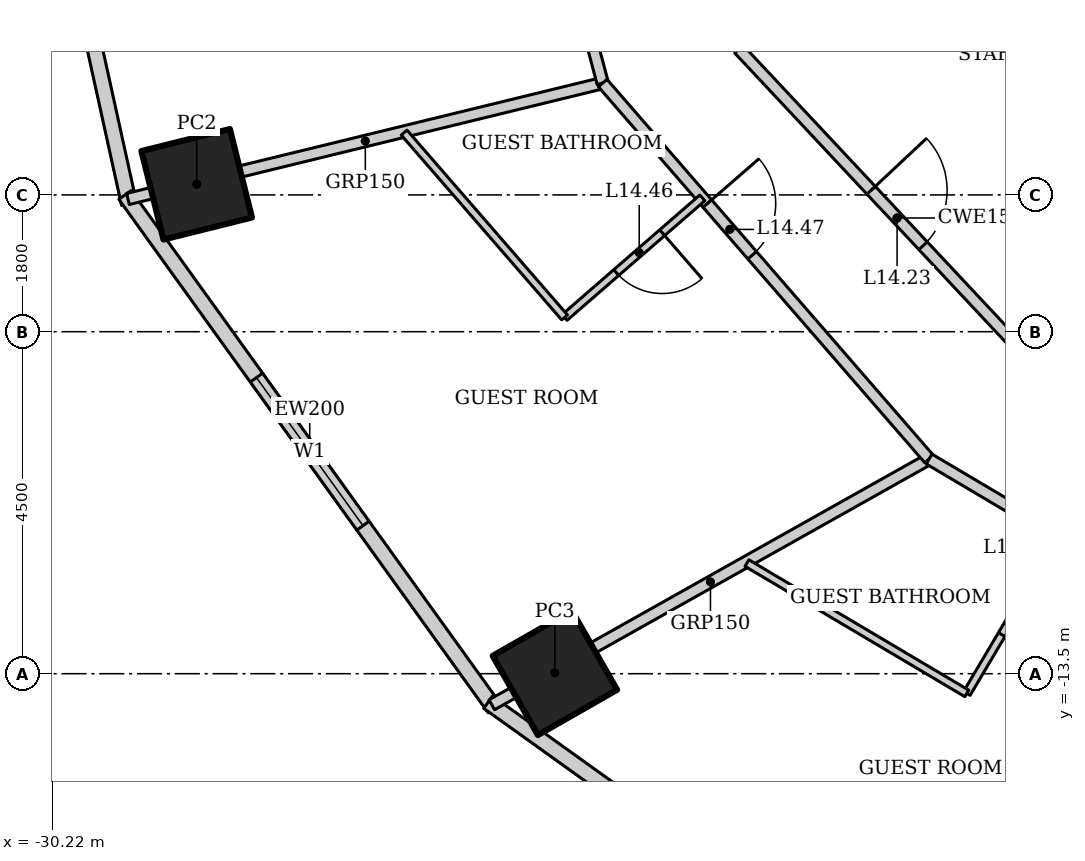
"""IFC4 building model, lengths in metres.
Left out: names, types, materials, properties, quantities, classifications, styles, units other than length and angle.
Written with IfcOpenShell. Run it as: python <this file> out.ifc"""

import sys

from ifc_helpers import new_model, si_unit, direction, frame, frame_2d, origin, origin_2d, place, context, subcontext, project, spatial, rectangle, hollow_rectangle, extrude, element, fill, save


model = new_model("IFC4")
c1 = context("Model", 3, precision=1e-05, world=origin(), true_north=direction((0.0, 1.0)))
c2 = subcontext(c1, "Body", "Model", "MODEL_VIEW")
j1 = project(units=[si_unit("LENGTHUNIT", "METRE"), si_unit("PLANEANGLEUNIT", "RADIAN")], contexts=[c1])
p1 = place(None, origin())
s1 = spatial("IfcSite", under=j1, at=p1, CompositionType="ELEMENT")
p2 = place(p1, origin())
s2 = spatial("IfcBuilding", under=s1, at=p2, CompositionType="ELEMENT")
p3 = place(p2, frame((0.0, 0.0, 65.8)))
s3 = spatial("IfcBuildingStorey", under=s2, at=p3, CompositionType="ELEMENT", Elevation=65.8)
p4 = place(p3, frame((-28.318, -7.06, 0.0), z_axis=(0.0, 0.0, 1.0), x_axis=(0.970295726276, 0.2419218956, 0.0)))
e1 = element("IfcColumn", 1, at=p4, inside=s3, PredefinedType="COLUMN", context=c2, shape_type="SweptSolid", body=[
    extrude(hollow_rectangle(XDim=1.2, YDim=1.2, WallThickness=0.1, at=origin_2d()), origin(), (0.0, 0.0, 1.0), 3.6),
])
p5 = place(p3, frame((-23.605, -13.489, 0.0), z_axis=(0.0, 0.0, 1.0), x_axis=(0.86824298017, 0.496139221777, 0.0)))
e2 = element("IfcColumn", 2, at=p5, inside=s3, PredefinedType="COLUMN", context=c2, shape_type="SweptSolid", body=[
    extrude(hollow_rectangle(XDim=1.2, YDim=1.2, WallThickness=0.12, at=origin_2d()), origin(), (0.0, 0.0, 1.0), 3.6),
])
p6 = place(p3, frame((-30.835, 0.067, 0.0), z_axis=(0.0, 0.0, 1.0), x_axis=(0.215238065514, -0.976561608478, 0.0)))
e3 = element("IfcWall", 3, at=p6, inside=s3, PredefinedType="SOLIDWALL", context=c2, shape_type="SweptSolid", body=[
    extrude(rectangle(XDim=7.562, YDim=0.2, at=frame_2d((3.781, 0.0))), origin(), (0.0, 0.0, 1.0), 3.4),
])
p7 = place(p6, frame((2.581, 0.0, 0.5)))
e4 = element("IfcOpeningElement", 4, at=p7, cuts=e3, PredefinedType="OPENING", context=c2, shape_type="SweptSolid", body=[
    extrude(rectangle(XDim=2.4, YDim=2.2, at=frame_2d((1.2, 1.1))), frame((0.0, 0.11, 0.0), z_axis=(0.0, -1.0, 0.0), x_axis=(1.0, 0.0, 0.0)), (0.0, 0.0, 1.0), 0.22),
])
p8 = place(p3, frame((-29.26, -7.2, 0.0), z_axis=(0.0, 0.0, 1.0), x_axis=(0.583937613703, -0.811798536155, 0.0)))
e5 = element("IfcWall", 5, at=p8, inside=s3, PredefinedType="SOLIDWALL", context=c2, shape_type="SweptSolid", body=[
    extrude(rectangle(XDim=8.323, YDim=0.2, at=frame_2d((4.162, 0.0))), origin(), (0.0, 0.0, 1.0), 3.4),
])
p9 = place(p8, frame((2.961, 0.0, 0.5)))
e6 = element("IfcOpeningElement", 6, at=p9, cuts=e5, PredefinedType="OPENING", context=c2, shape_type="SweptSolid", body=[
    extrude(rectangle(XDim=2.4, YDim=2.2, at=frame_2d((1.2, 1.1))), frame((0.0, 0.11, 0.0), z_axis=(0.0, -1.0, 0.0), x_axis=(1.0, 0.0, 0.0)), (0.0, 0.0, 1.0), 0.22),
])
p10 = place(p3, frame((-24.482, -13.875, 0.0), z_axis=(0.0, 0.0, 1.0), x_axis=(0.812791321576, -0.582554948112, 0.0)))
e7 = element("IfcWall", 7, at=p10, inside=s3, PredefinedType="SOLIDWALL", context=c2, shape_type="SweptSolid", body=[
    extrude(rectangle(XDim=8.063, YDim=0.2, at=frame_2d((4.032, 0.0))), origin(), (0.0, 0.0, 1.0), 3.4),
])
p11 = place(p10, frame((2.832, 0.0, 0.5)))
e8 = element("IfcOpeningElement", 8, at=p11, cuts=e7, PredefinedType="OPENING", context=c2, shape_type="SweptSolid", body=[
    extrude(rectangle(XDim=2.4, YDim=2.2, at=frame_2d((1.2, 1.1))), frame((0.0, 0.11, 0.0), z_axis=(0.0, -1.0, 0.0), x_axis=(1.0, 0.0, 0.0)), (0.0, 0.0, 1.0), 0.22),
])
p12 = place(p3, frame((-29.222, -7.254, 0.0), z_axis=(0.0, 0.0, 1.0), x_axis=(0.971456980633, 0.237215797913, 0.0)))
e9 = element("IfcWall", 9, at=p12, inside=s3, PredefinedType="PARTITIONING", context=c2, shape_type="SweptSolid", body=[
    extrude(rectangle(XDim=6.429, YDim=0.15, at=frame_2d((3.215, 0.0))), origin(), (0.0, 0.0, 1.0), 2.332),
])
p13 = place(p3, frame((-24.435, -13.909, 0.0), z_axis=(0.0, 0.0, 1.0), x_axis=(0.871747379892, 0.489955616001, 0.0)))
e10 = element("IfcWall", 10, at=p13, inside=s3, PredefinedType="PARTITIONING", context=c2, shape_type="SweptSolid", body=[
    extrude(rectangle(XDim=6.6, YDim=0.15, at=frame_2d((3.3, 0.0))), origin(), (0.0, 0.0, 1.0), 2.693),
])
p14 = place(p3, frame((-17.97, -18.542, 0.0), z_axis=(0.0, 0.0, 1.0), x_axis=(0.699736251994, 0.714401272147, 0.0)))
e11 = element("IfcWall", 11, at=p14, inside=s3, PredefinedType="PARTITIONING", context=c2, shape_type="SweptSolid", body=[
    extrude(rectangle(XDim=6.593, YDim=0.15, at=frame_2d((3.296, 0.0))), origin(), (0.0, 0.0, 1.0), 2.528),
])
p15 = place(p3, frame((-24.5, 0.0, 0.0), z_axis=(0.0, 0.0, 1.0), x_axis=(0.257083265334, -0.966389256296, 0.0)))
e12 = element("IfcWall", 12, at=p15, inside=s3, PredefinedType="PARTITIONING", context=c2, shape_type="SweptSolid", body=[
    extrude(rectangle(XDim=5.928, YDim=0.15, at=frame_2d((2.964, 0.0))), origin(), (0.0, 0.0, 1.0), 3.45),
])
p16 = place(p15, frame((2.1, 0.0, 0.0)))
e13 = element("IfcOpeningElement", 13, at=p16, cuts=e12, PredefinedType="OPENING", context=c2, shape_type="SweptSolid", body=[
    extrude(rectangle(XDim=0.9, YDim=2.1, at=frame_2d((0.45, 1.05))), frame((0.0, 0.085, 0.0), z_axis=(0.0, -1.0, 0.0), x_axis=(1.0, 0.0, 0.0)), (0.0, 0.0, 1.0), 0.17),
])
p17 = place(p3, frame((-22.976, -5.729, 0.0), z_axis=(0.0, 0.0, 1.0), x_axis=(0.655599989166, -0.755108372491, 0.0)))
e14 = element("IfcWall", 14, at=p17, inside=s3, PredefinedType="PARTITIONING", context=c2, shape_type="SweptSolid", body=[
    extrude(rectangle(XDim=6.551, YDim=0.15, at=frame_2d((3.275, 0.0))), origin(), (0.0, 0.0, 1.0), 3.45),
])
p18 = place(p17, frame((2.1, 0.0, 0.0)))
e15 = element("IfcOpeningElement", 15, at=p18, cuts=e14, PredefinedType="OPENING", context=c2, shape_type="SweptSolid", body=[
    extrude(rectangle(XDim=0.9, YDim=2.1, at=frame_2d((0.45, 1.05))), frame((0.0, 0.085, 0.0), z_axis=(0.0, -1.0, 0.0), x_axis=(1.0, 0.0, 0.0)), (0.0, 0.0, 1.0), 0.17),
])
p19 = place(p3, frame((-18.681, -10.675, 0.0), z_axis=(0.0, 0.0, 1.0), x_axis=(0.860147339762, -0.510045639036, 0.0)))
e16 = element("IfcWall", 16, at=p19, inside=s3, PredefinedType="PARTITIONING", context=c2, shape_type="SweptSolid", body=[
    extrude(rectangle(XDim=6.19, YDim=0.15, at=frame_2d((3.095, 0.0))), origin(), (0.0, 0.0, 1.0), 3.45),
])
p20 = place(p19, frame((2.505, 0.0, 0.0)))
e17 = element("IfcOpeningElement", 17, at=p20, cuts=e16, PredefinedType="OPENING", context=c2, shape_type="SweptSolid", body=[
    extrude(rectangle(XDim=0.9, YDim=2.1, at=frame_2d((0.45, 1.05))), frame((0.0, 0.085, 0.0), z_axis=(0.0, -1.0, 0.0), x_axis=(1.0, 0.0, 0.0)), (0.0, 0.0, 1.0), 0.17),
])
p21 = place(p3, frame((-21.184, -5.282, 0.0), z_axis=(0.0, 0.0, 1.0), x_axis=(0.68365836236, -0.729802194828, 0.0)))
e18 = element("IfcWall", 18, at=p21, inside=s3, PredefinedType="PARTITIONING", context=c2, shape_type="SweptSolid", body=[
    extrude(rectangle(XDim=6.09, YDim=0.15, at=frame_2d((3.045, 0.0))), origin(), (0.0, 0.0, 1.0), 3.45),
])
p22 = place(p21, frame((2.545, 0.0, 0.0)))
e19 = element("IfcOpeningElement", 19, at=p22, cuts=e18, PredefinedType="OPENING", context=c2, shape_type="SweptSolid", body=[
    extrude(rectangle(XDim=1.0, YDim=2.1, at=frame_2d((0.5, 1.05))), frame((0.0, 0.085, 0.0), z_axis=(0.0, -1.0, 0.0), x_axis=(1.0, 0.0, 0.0)), (0.0, 0.0, 1.0), 0.17),
])
p23 = place(p3, frame((-21.665, -7.239, 0.0), z_axis=(0.0, 0.0, 1.0), x_axis=(-0.755098052661, -0.655611875172, 0.0)))
e20 = element("IfcWall", 20, at=p23, inside=s3, PredefinedType="PARTITIONING", context=c2, shape_type="SweptSolid", body=[
    extrude(rectangle(XDim=2.4, YDim=0.1, at=frame_2d((1.2, 0.0))), origin(), (0.0, 0.0, 1.0), 3.45),
])
p24 = place(p23, frame((0.7, 0.0, 0.0)))
e21 = element("IfcOpeningElement", 21, at=p24, cuts=e20, PredefinedType="OPENING", context=c2, shape_type="SweptSolid", body=[
    extrude(rectangle(XDim=0.8, YDim=2.1, at=frame_2d((0.4, 1.05))), frame((0.0, 0.06, 0.0), z_axis=(0.0, -1.0, 0.0), x_axis=(1.0, 0.0, 0.0)), (0.0, 0.0, 1.0), 0.12),
])
p25 = place(p3, frame((-23.477, -8.812, 0.0), z_axis=(0.0, 0.0, 1.0), x_axis=(-0.655596826012, 0.755111118792, 0.0)))
e22 = element("IfcWall", 22, at=p25, inside=s3, PredefinedType="PARTITIONING", context=c2, shape_type="SweptSolid", body=[
    extrude(rectangle(XDim=3.221, YDim=0.1, at=frame_2d((1.611, 0.0))), origin(), (0.0, 0.0, 1.0), 3.45),
])
p26 = place(p3, frame((-16.961, -11.695, 0.0), z_axis=(0.0, 0.0, 1.0), x_axis=(-0.510075642074, -0.860129548012, 0.0)))
e23 = element("IfcWall", 23, at=p26, inside=s3, PredefinedType="PARTITIONING", context=c2, shape_type="SweptSolid", body=[
    extrude(rectangle(XDim=2.4, YDim=0.1, at=frame_2d((1.2, 0.0))), origin(), (0.0, 0.0, 1.0), 3.45),
])
p27 = place(p26, frame((0.7, 0.0, 0.0)))
e24 = element("IfcOpeningElement", 24, at=p27, cuts=e23, PredefinedType="OPENING", context=c2, shape_type="SweptSolid", body=[
    extrude(rectangle(XDim=0.8, YDim=2.1, at=frame_2d((0.4, 1.05))), frame((0.0, 0.06, 0.0), z_axis=(0.0, -1.0, 0.0), x_axis=(1.0, 0.0, 0.0)), (0.0, 0.0, 1.0), 0.12),
])
p28 = place(p3, frame((-18.185, -13.76, 0.0), z_axis=(0.0, 0.0, 1.0), x_axis=(-0.860146437071, 0.510047161343, 0.0)))
e25 = element("IfcWall", 25, at=p28, inside=s3, PredefinedType="PARTITIONING", context=c2, shape_type="SweptSolid", body=[
    extrude(rectangle(XDim=3.363, YDim=0.1, at=frame_2d((1.681, 0.0))), origin(), (0.0, 0.0, 1.0), 3.45),
])
p29 = place(p9, origin())
e26 = element("IfcWindow", 26, at=p29, inside=s3, PartitioningType="SINGLE_PANEL", PredefinedType="WINDOW", context=c2, shape_type="SweptSolid", body=[
    extrude(rectangle(XDim=2.4, YDim=2.2, at=frame_2d((1.2, 1.1))), frame((0.0, 0.03, 0.0), z_axis=(0.0, -1.0, 0.0), x_axis=(1.0, 0.0, 0.0)), (0.0, 0.0, 1.0), 0.06),
])
fill(e6, e26)
p30 = place(p22, origin())
e27 = element("IfcDoor", 27, at=p30, inside=s3, OperationType="SINGLE_SWING_LEFT", PredefinedType="DOOR", context=c2, shape_type="SweptSolid", body=[
    extrude(rectangle(XDim=1.0, YDim=2.1, at=frame_2d((0.5, 1.05))), frame((0.0, 0.025, 0.0), z_axis=(0.0, -1.0, 0.0), x_axis=(1.0, 0.0, 0.0)), (0.0, 0.0, 1.0), 0.05),
])
fill(e19, e27)
p31 = place(p24, origin())
e28 = element("IfcDoor", 28, at=p31, inside=s3, OperationType="SINGLE_SWING_LEFT", PredefinedType="DOOR", context=c2, shape_type="SweptSolid", body=[
    extrude(rectangle(XDim=0.8, YDim=2.1, at=frame_2d((0.4, 1.05))), frame((0.0, 0.025, 0.0), z_axis=(0.0, -1.0, 0.0), x_axis=(1.0, 0.0, 0.0)), (0.0, 0.0, 1.0), 0.05),
])
fill(e21, e28)
p32 = place(p18, origin())
e29 = element("IfcDoor", 29, at=p32, inside=s3, OperationType="SINGLE_SWING_LEFT", PredefinedType="DOOR", context=c2, shape_type="SweptSolid", body=[
    extrude(rectangle(XDim=0.9, YDim=2.1, at=frame_2d((0.45, 1.05))), frame((0.0, 0.025, 0.0), z_axis=(0.0, -1.0, 0.0), x_axis=(1.0, 0.0, 0.0)), (0.0, 0.0, 1.0), 0.05),
])
fill(e15, e29)
p33 = place(p27, origin())
e30 = element("IfcDoor", 30, at=p33, inside=s3, OperationType="SINGLE_SWING_LEFT", PredefinedType="DOOR", context=c2, shape_type="SweptSolid", body=[
    extrude(rectangle(XDim=0.8, YDim=2.1, at=frame_2d((0.4, 1.05))), frame((0.0, 0.025, 0.0), z_axis=(0.0, -1.0, 0.0), x_axis=(1.0, 0.0, 0.0)), (0.0, 0.0, 1.0), 0.05),
])
fill(e24, e30)
save(model, sys.argv[1])
